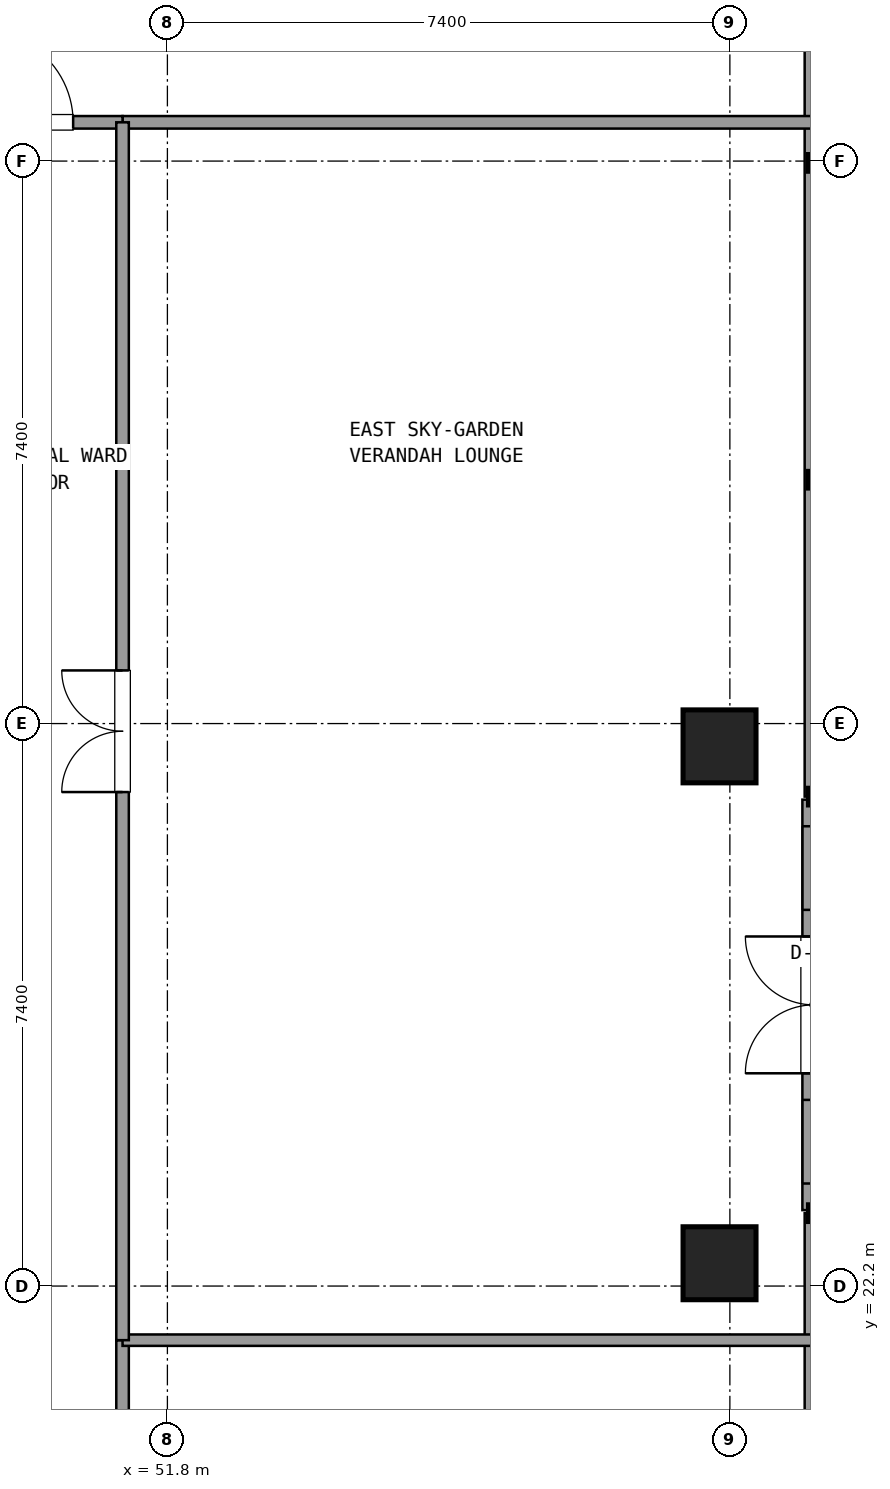
"""IFC4 building model, lengths in metres.
Left out: names, types, materials, properties, quantities, classifications, styles, units other than length and angle.
Written with IfcOpenShell. Run it as: python <this file> out.ifc"""

import sys

from ifc_helpers import new_model, si_unit, direction, frame, frame_2d, origin, origin_2d, place, context, subcontext, project, spatial, rectangle, extrude, element, fill, save


model = new_model("IFC4")
c1 = context("Model", 3, precision=1e-05, world=origin(), true_north=direction((0.0, 1.0)))
c2 = subcontext(c1, "Body", "Model", "MODEL_VIEW")
j1 = project(units=[si_unit("LENGTHUNIT", "METRE"), si_unit("PLANEANGLEUNIT", "RADIAN")], contexts=[c1])
p1 = place(None, origin())
s1 = spatial("IfcSite", under=j1, at=p1, CompositionType="ELEMENT")
p2 = place(p1, origin())
s2 = spatial("IfcBuilding", under=s1, at=p2, CompositionType="ELEMENT")
p3 = place(p2, frame((0.0, 0.0, 129.06)))
s3 = spatial("IfcBuildingStorey", under=s2, at=p3, CompositionType="ELEMENT", Elevation=129.06)
for number, where, z_axis, x_axis in (
    (1, (59.064, 22.5, 0.021), (0.0, 0.0, 1.0), (1.0, 0.0, 0.0)),
    (2, (59.064, 29.3, 0.021), (0.0, 0.0, 1.0), (1.0, 0.0, 0.0)),
):
    element("IfcColumn", number, at=place(p3, frame(where, z_axis=z_axis, x_axis=x_axis)), inside=s3, PredefinedType="COLUMN", context=c2, shape_type="SweptSolid", body=[
        extrude(rectangle(XDim=0.96, YDim=0.96, at=origin_2d()), origin(), (0.0, 0.0, 1.0), 5.739),
    ])
p4 = place(p3, frame((60.304, 23.199, 0.0), z_axis=(0.0, 0.0, 1.0), x_axis=(0.0, 1.0, 0.0)))
e3 = element("IfcWall", 3, at=p4, inside=s3, PredefinedType="SOLIDWALL", context=c2, shape_type="SweptSolid", body=[
    extrude(rectangle(XDim=5.4, YDim=0.3, at=frame_2d((2.7, 0.0))), origin(), (0.0, 0.0, 1.0), 4.83),
])
p5 = place(p4, frame((1.8, 0.0, 0.0)))
e4 = element("IfcOpeningElement", 4, at=p5, cuts=e3, PredefinedType="OPENING", context=c2, shape_type="SweptSolid", body=[
    extrude(rectangle(XDim=1.8, YDim=2.25, at=frame_2d((0.9, 1.125))), frame((0.0, 0.16, 0.0), z_axis=(0.0, -1.0, 0.0), x_axis=(1.0, 0.0, 0.0)), (0.0, 0.0, 1.0), 0.32),
])
p6 = place(p4, frame((0.35, 0.0, 0.4)))
e5 = element("IfcOpeningElement", 5, at=p6, cuts=e3, PredefinedType="OPENING", context=c2, shape_type="SweptSolid", body=[
    extrude(rectangle(XDim=1.1, YDim=1.8, at=frame_2d((0.55, 0.9))), frame((0.0, 0.16, 0.0), z_axis=(0.0, -1.0, 0.0), x_axis=(1.0, 0.0, 0.0)), (0.0, 0.0, 1.0), 0.32),
])
p7 = place(p4, frame((3.95, 0.0, 0.4)))
e6 = element("IfcOpeningElement", 6, at=p7, cuts=e3, PredefinedType="OPENING", context=c2, shape_type="SweptSolid", body=[
    extrude(rectangle(XDim=1.1, YDim=1.8, at=frame_2d((0.55, 0.9))), frame((0.0, 0.16, 0.0), z_axis=(0.0, -1.0, 0.0), x_axis=(1.0, 0.0, 0.0)), (0.0, 0.0, 1.0), 0.32),
])
p8 = place(p3, frame((60.304, 10.655, 0.0), z_axis=(0.0, 0.0, 1.0), x_axis=(0.0, 1.0, 0.0)))
e7 = element("IfcWall", 7, at=p8, inside=s3, PredefinedType="SOLIDWALL", context=c2, shape_type="SweptSolid", body=[
    extrude(rectangle(XDim=12.504, YDim=0.24, at=frame_2d((6.252, 0.0))), origin(), (0.0, 0.0, 1.0), 0.85),
])
p9 = place(p3, frame((60.304, 28.639, 0.0), z_axis=(0.0, 0.0, 1.0), x_axis=(0.0, 1.0, 0.0)))
e8 = element("IfcWall", 8, at=p9, inside=s3, PredefinedType="SOLIDWALL", context=c2, shape_type="SweptSolid", body=[
    extrude(rectangle(XDim=12.506, YDim=0.24, at=frame_2d((6.253, 0.0))), origin(), (0.0, 0.0, 1.0), 0.85),
])
p10 = place(p3, frame((51.21, 37.51, 0.0), z_axis=(0.0, 0.0, 1.0), x_axis=(1.0, 0.0, 0.0)))
e9 = element("IfcWall", 9, at=p10, inside=s3, PredefinedType="PARTITIONING", context=c2, shape_type="SweptSolid", body=[
    extrude(rectangle(XDim=9.074, YDim=0.165, at=frame_2d((4.537, 0.0))), origin(), (0.0, 0.0, 1.0), 4.77),
])
p11 = place(p3, frame((48.71, 37.51, 0.0), z_axis=(0.0, 0.0, 1.0), x_axis=(1.0, 0.0, 0.0)))
e10 = element("IfcWall", 10, at=p11, inside=s3, PredefinedType="PARTITIONING", context=c2, shape_type="SweptSolid", body=[
    extrude(rectangle(XDim=2.5, YDim=0.165, at=frame_2d((1.25, 0.0))), origin(), (0.0, 0.0, 1.0), 4.77),
])
p12 = place(p11, frame((0.65, 0.0, 0.0)))
e11 = element("IfcOpeningElement", 11, at=p12, cuts=e10, PredefinedType="OPENING", context=c2, shape_type="SweptSolid", body=[
    extrude(rectangle(XDim=1.2, YDim=2.15, at=frame_2d((0.6, 1.075))), frame((0.0, 0.093, 0.0), z_axis=(0.0, -1.0, 0.0), x_axis=(1.0, 0.0, 0.0)), (0.0, 0.0, 1.0), 0.185),
])
p13 = place(p3, frame((51.21, 14.29, 0.0), z_axis=(0.0, 0.0, 1.0), x_axis=(0.0, 1.0, 0.0)))
e12 = element("IfcWall", 12, at=p13, inside=s3, PredefinedType="PARTITIONING", context=c2, shape_type="SweptSolid", body=[
    extrude(rectangle(XDim=7.198, YDim=0.165, at=frame_2d((3.599, 0.0))), origin(), (0.0, 0.0, 1.0), 4.77),
])
p14 = place(p13, frame((2.799, 0.0, 0.0)))
e13 = element("IfcOpeningElement", 13, at=p14, cuts=e12, PredefinedType="OPENING", context=c2, shape_type="SweptSolid", body=[
    extrude(rectangle(XDim=1.6, YDim=2.2, at=frame_2d((0.8, 1.1))), frame((0.0, 0.093, 0.0), z_axis=(0.0, -1.0, 0.0), x_axis=(1.0, 0.0, 0.0)), (0.0, 0.0, 1.0), 0.185),
])
p15 = place(p3, frame((51.21, 21.488, 0.0), z_axis=(0.0, 0.0, 1.0), x_axis=(1.0, 0.0, 0.0)))
e14 = element("IfcWall", 14, at=p15, inside=s3, PredefinedType="PARTITIONING", context=c2, shape_type="SweptSolid", body=[
    extrude(rectangle(XDim=9.074, YDim=0.15, at=frame_2d((4.537, 0.0))), origin(), (0.0, 0.0, 1.0), 4.77),
])
p16 = place(p3, frame((51.21, 21.488, 0.0), z_axis=(0.0, 0.0, 1.0), x_axis=(0.0, 1.0, 0.0)))
e15 = element("IfcWall", 15, at=p16, inside=s3, PredefinedType="PARTITIONING", context=c2, shape_type="SweptSolid", body=[
    extrude(rectangle(XDim=16.022, YDim=0.165, at=frame_2d((8.011, 0.0))), origin(), (0.0, 0.0, 1.0), 4.77),
])
p17 = place(p16, frame((7.211, 0.0, 0.0)))
e16 = element("IfcOpeningElement", 16, at=p17, cuts=e15, PredefinedType="OPENING", context=c2, shape_type="SweptSolid", body=[
    extrude(rectangle(XDim=1.6, YDim=2.2, at=frame_2d((0.8, 1.1))), frame((0.0, 0.093, 0.0), z_axis=(0.0, -1.0, 0.0), x_axis=(1.0, 0.0, 0.0)), (0.0, 0.0, 1.0), 0.185),
])
p18 = place(p12, origin())
e17 = element("IfcDoor", 17, at=p18, inside=s3, OperationType="SINGLE_SWING_LEFT", PredefinedType="DOOR", context=c2, shape_type="SweptSolid", body=[
    extrude(rectangle(XDim=1.2, YDim=2.15, at=frame_2d((0.6, 1.075))), frame((0.0, 0.025, 0.0), z_axis=(0.0, -1.0, 0.0), x_axis=(1.0, 0.0, 0.0)), (0.0, 0.0, 1.0), 0.05),
])
fill(e11, e17)
p19 = place(p17, origin())
e18 = element("IfcDoor", 18, at=p19, inside=s3, OperationType="DOUBLE_DOOR_SINGLE_SWING", PredefinedType="DOOR", context=c2, shape_type="SweptSolid", body=[
    extrude(rectangle(XDim=1.6, YDim=2.2, at=frame_2d((0.8, 1.1))), frame((0.0, 0.025, 0.0), z_axis=(0.0, -1.0, 0.0), x_axis=(1.0, 0.0, 0.0)), (0.0, 0.0, 1.0), 0.05),
])
fill(e16, e18)
save(model, sys.argv[1])
